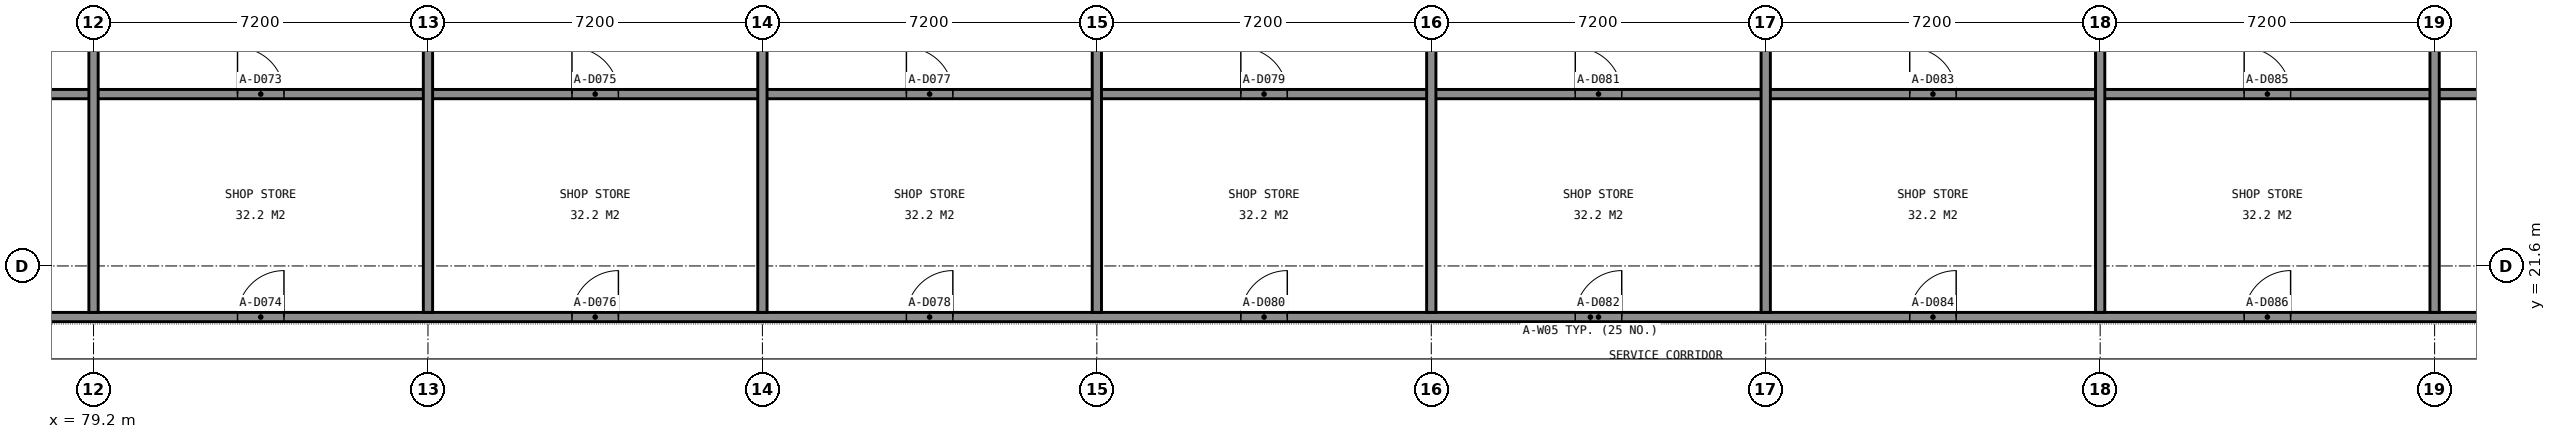
"""IFC4 building model, lengths in metres.
Left out: names, types, materials, properties, quantities, classifications, styles, units other than length and angle.
Written with IfcOpenShell. Run it as: python <this file> out.ifc"""

import sys

from ifc_helpers import new_model, si_unit, direction, frame, frame_2d, origin, place, context, subcontext, project, spatial, rectangle, extrude, element, fill, save


model = new_model("IFC4")
c1 = context("Model", 3, precision=1e-05, world=origin(), true_north=direction((0.0, 1.0)))
c2 = subcontext(c1, "Body", "Model", "MODEL_VIEW")
j1 = project(units=[si_unit("LENGTHUNIT", "METRE"), si_unit("PLANEANGLEUNIT", "RADIAN")], contexts=[c1])
p1 = place(None, origin())
s1 = spatial("IfcSite", under=j1, at=p1, CompositionType="ELEMENT")
p2 = place(p1, origin())
s2 = spatial("IfcBuilding", under=s1, at=p2, CompositionType="ELEMENT")
p3 = place(p2, origin())
s3 = spatial("IfcBuildingStorey", under=s2, at=p3, CompositionType="ELEMENT", Elevation=0.0)
p4 = place(p3, frame((54.35, 20.5, 0.0), z_axis=(0.0, 0.0, 1.0), x_axis=(1.0, 0.0, 0.0)))
e1 = element("IfcWall", 1, at=p4, inside=s3, PredefinedType="PARTITIONING", context=c2, shape_type="SweptSolid", body=[
    extrude(rectangle(XDim=92.9, YDim=0.2, at=frame_2d((46.45, 0.0))), origin(), (0.0, 0.0, 1.0), 3.5),
])
p5 = place(p4, frame((1.1, 0.0, 0.0)))
e2 = element("IfcOpeningElement", 2, at=p5, cuts=e1, PredefinedType="OPENING", context=c2, shape_type="SweptSolid", body=[
    extrude(rectangle(XDim=0.9, YDim=2.1, at=frame_2d((0.45, 1.05))), frame((0.0, 0.11, 0.0), z_axis=(0.0, -1.0, 0.0), x_axis=(1.0, 0.0, 0.0)), (0.0, 0.0, 1.0), 0.22),
])
p6 = place(p4, frame((90.9, 0.0, 0.0)))
e3 = element("IfcOpeningElement", 3, at=p6, cuts=e1, PredefinedType="OPENING", context=c2, shape_type="SweptSolid", body=[
    extrude(rectangle(XDim=0.9, YDim=2.1, at=frame_2d((0.45, 1.05))), frame((0.0, 0.11, 0.0), z_axis=(0.0, -1.0, 0.0), x_axis=(1.0, 0.0, 0.0)), (0.0, 0.0, 1.0), 0.22),
])
p7 = place(p4, frame((6.35, 0.0, 0.0)))
e4 = element("IfcOpeningElement", 4, at=p7, cuts=e1, PredefinedType="OPENING", context=c2, shape_type="SweptSolid", body=[
    extrude(rectangle(XDim=1.0, YDim=2.1, at=frame_2d((0.5, 1.05))), frame((0.0, 0.11, 0.0), z_axis=(0.0, -1.0, 0.0), x_axis=(1.0, 0.0, 0.0)), (0.0, 0.0, 1.0), 0.22),
])
p8 = place(p4, frame((13.55, 0.0, 0.0)))
e5 = element("IfcOpeningElement", 5, at=p8, cuts=e1, PredefinedType="OPENING", context=c2, shape_type="SweptSolid", body=[
    extrude(rectangle(XDim=1.0, YDim=2.1, at=frame_2d((0.5, 1.05))), frame((0.0, 0.11, 0.0), z_axis=(0.0, -1.0, 0.0), x_axis=(1.0, 0.0, 0.0)), (0.0, 0.0, 1.0), 0.22),
])
p9 = place(p4, frame((20.75, 0.0, 0.0)))
e6 = element("IfcOpeningElement", 6, at=p9, cuts=e1, PredefinedType="OPENING", context=c2, shape_type="SweptSolid", body=[
    extrude(rectangle(XDim=1.0, YDim=2.1, at=frame_2d((0.5, 1.05))), frame((0.0, 0.11, 0.0), z_axis=(0.0, -1.0, 0.0), x_axis=(1.0, 0.0, 0.0)), (0.0, 0.0, 1.0), 0.22),
])
p10 = place(p4, frame((27.95, 0.0, 0.0)))
e7 = element("IfcOpeningElement", 7, at=p10, cuts=e1, PredefinedType="OPENING", context=c2, shape_type="SweptSolid", body=[
    extrude(rectangle(XDim=1.0, YDim=2.1, at=frame_2d((0.5, 1.05))), frame((0.0, 0.11, 0.0), z_axis=(0.0, -1.0, 0.0), x_axis=(1.0, 0.0, 0.0)), (0.0, 0.0, 1.0), 0.22),
])
p11 = place(p4, frame((35.15, 0.0, 0.0)))
e8 = element("IfcOpeningElement", 8, at=p11, cuts=e1, PredefinedType="OPENING", context=c2, shape_type="SweptSolid", body=[
    extrude(rectangle(XDim=1.0, YDim=2.1, at=frame_2d((0.5, 1.05))), frame((0.0, 0.11, 0.0), z_axis=(0.0, -1.0, 0.0), x_axis=(1.0, 0.0, 0.0)), (0.0, 0.0, 1.0), 0.22),
])
p12 = place(p4, frame((42.35, 0.0, 0.0)))
e9 = element("IfcOpeningElement", 9, at=p12, cuts=e1, PredefinedType="OPENING", context=c2, shape_type="SweptSolid", body=[
    extrude(rectangle(XDim=1.0, YDim=2.1, at=frame_2d((0.5, 1.05))), frame((0.0, 0.11, 0.0), z_axis=(0.0, -1.0, 0.0), x_axis=(1.0, 0.0, 0.0)), (0.0, 0.0, 1.0), 0.22),
])
p13 = place(p4, frame((49.55, 0.0, 0.0)))
e10 = element("IfcOpeningElement", 10, at=p13, cuts=e1, PredefinedType="OPENING", context=c2, shape_type="SweptSolid", body=[
    extrude(rectangle(XDim=1.0, YDim=2.1, at=frame_2d((0.5, 1.05))), frame((0.0, 0.11, 0.0), z_axis=(0.0, -1.0, 0.0), x_axis=(1.0, 0.0, 0.0)), (0.0, 0.0, 1.0), 0.22),
])
p14 = place(p4, frame((56.75, 0.0, 0.0)))
e11 = element("IfcOpeningElement", 11, at=p14, cuts=e1, PredefinedType="OPENING", context=c2, shape_type="SweptSolid", body=[
    extrude(rectangle(XDim=1.0, YDim=2.1, at=frame_2d((0.5, 1.05))), frame((0.0, 0.11, 0.0), z_axis=(0.0, -1.0, 0.0), x_axis=(1.0, 0.0, 0.0)), (0.0, 0.0, 1.0), 0.22),
])
p15 = place(p4, frame((63.95, 0.0, 0.0)))
e12 = element("IfcOpeningElement", 12, at=p15, cuts=e1, PredefinedType="OPENING", context=c2, shape_type="SweptSolid", body=[
    extrude(rectangle(XDim=1.0, YDim=2.1, at=frame_2d((0.5, 1.05))), frame((0.0, 0.11, 0.0), z_axis=(0.0, -1.0, 0.0), x_axis=(1.0, 0.0, 0.0)), (0.0, 0.0, 1.0), 0.22),
])
p16 = place(p4, frame((71.15, 0.0, 0.0)))
e13 = element("IfcOpeningElement", 13, at=p16, cuts=e1, PredefinedType="OPENING", context=c2, shape_type="SweptSolid", body=[
    extrude(rectangle(XDim=1.0, YDim=2.1, at=frame_2d((0.5, 1.05))), frame((0.0, 0.11, 0.0), z_axis=(0.0, -1.0, 0.0), x_axis=(1.0, 0.0, 0.0)), (0.0, 0.0, 1.0), 0.22),
])
p17 = place(p4, frame((78.35, 0.0, 0.0)))
e14 = element("IfcOpeningElement", 14, at=p17, cuts=e1, PredefinedType="OPENING", context=c2, shape_type="SweptSolid", body=[
    extrude(rectangle(XDim=1.0, YDim=2.1, at=frame_2d((0.5, 1.05))), frame((0.0, 0.11, 0.0), z_axis=(0.0, -1.0, 0.0), x_axis=(1.0, 0.0, 0.0)), (0.0, 0.0, 1.0), 0.22),
])
p18 = place(p4, frame((85.55, 0.0, 0.0)))
e15 = element("IfcOpeningElement", 15, at=p18, cuts=e1, PredefinedType="OPENING", context=c2, shape_type="SweptSolid", body=[
    extrude(rectangle(XDim=1.0, YDim=2.1, at=frame_2d((0.5, 1.05))), frame((0.0, 0.11, 0.0), z_axis=(0.0, -1.0, 0.0), x_axis=(1.0, 0.0, 0.0)), (0.0, 0.0, 1.0), 0.22),
])
p19 = place(p3, frame((57.7, 25.3, 0.0), z_axis=(0.0, 0.0, 1.0), x_axis=(1.0, 0.0, 0.0)))
e16 = element("IfcWall", 16, at=p19, inside=s3, PredefinedType="PARTITIONING", context=c2, shape_type="SweptSolid", body=[
    extrude(rectangle(XDim=86.2, YDim=0.2, at=frame_2d((43.1, 0.0))), origin(), (0.0, 0.0, 1.0), 3.5),
])
p20 = place(p19, frame((3.0, 0.0, 0.0)))
e17 = element("IfcOpeningElement", 17, at=p20, cuts=e16, PredefinedType="OPENING", context=c2, shape_type="SweptSolid", body=[
    extrude(rectangle(XDim=1.0, YDim=2.1, at=frame_2d((0.5, 1.05))), frame((0.0, 0.11, 0.0), z_axis=(0.0, -1.0, 0.0), x_axis=(1.0, 0.0, 0.0)), (0.0, 0.0, 1.0), 0.22),
])
p21 = place(p19, frame((10.2, 0.0, 0.0)))
e18 = element("IfcOpeningElement", 18, at=p21, cuts=e16, PredefinedType="OPENING", context=c2, shape_type="SweptSolid", body=[
    extrude(rectangle(XDim=1.0, YDim=2.1, at=frame_2d((0.5, 1.05))), frame((0.0, 0.11, 0.0), z_axis=(0.0, -1.0, 0.0), x_axis=(1.0, 0.0, 0.0)), (0.0, 0.0, 1.0), 0.22),
])
p22 = place(p19, frame((17.4, 0.0, 0.0)))
e19 = element("IfcOpeningElement", 19, at=p22, cuts=e16, PredefinedType="OPENING", context=c2, shape_type="SweptSolid", body=[
    extrude(rectangle(XDim=1.0, YDim=2.1, at=frame_2d((0.5, 1.05))), frame((0.0, 0.11, 0.0), z_axis=(0.0, -1.0, 0.0), x_axis=(1.0, 0.0, 0.0)), (0.0, 0.0, 1.0), 0.22),
])
p23 = place(p19, frame((24.6, 0.0, 0.0)))
e20 = element("IfcOpeningElement", 20, at=p23, cuts=e16, PredefinedType="OPENING", context=c2, shape_type="SweptSolid", body=[
    extrude(rectangle(XDim=1.0, YDim=2.1, at=frame_2d((0.5, 1.05))), frame((0.0, 0.11, 0.0), z_axis=(0.0, -1.0, 0.0), x_axis=(1.0, 0.0, 0.0)), (0.0, 0.0, 1.0), 0.22),
])
p24 = place(p19, frame((31.8, 0.0, 0.0)))
e21 = element("IfcOpeningElement", 21, at=p24, cuts=e16, PredefinedType="OPENING", context=c2, shape_type="SweptSolid", body=[
    extrude(rectangle(XDim=1.0, YDim=2.1, at=frame_2d((0.5, 1.05))), frame((0.0, 0.11, 0.0), z_axis=(0.0, -1.0, 0.0), x_axis=(1.0, 0.0, 0.0)), (0.0, 0.0, 1.0), 0.22),
])
p25 = place(p19, frame((39.0, 0.0, 0.0)))
e22 = element("IfcOpeningElement", 22, at=p25, cuts=e16, PredefinedType="OPENING", context=c2, shape_type="SweptSolid", body=[
    extrude(rectangle(XDim=1.0, YDim=2.1, at=frame_2d((0.5, 1.05))), frame((0.0, 0.11, 0.0), z_axis=(0.0, -1.0, 0.0), x_axis=(1.0, 0.0, 0.0)), (0.0, 0.0, 1.0), 0.22),
])
p26 = place(p19, frame((46.2, 0.0, 0.0)))
e23 = element("IfcOpeningElement", 23, at=p26, cuts=e16, PredefinedType="OPENING", context=c2, shape_type="SweptSolid", body=[
    extrude(rectangle(XDim=1.0, YDim=2.1, at=frame_2d((0.5, 1.05))), frame((0.0, 0.11, 0.0), z_axis=(0.0, -1.0, 0.0), x_axis=(1.0, 0.0, 0.0)), (0.0, 0.0, 1.0), 0.22),
])
p27 = place(p19, frame((53.4, 0.0, 0.0)))
e24 = element("IfcOpeningElement", 24, at=p27, cuts=e16, PredefinedType="OPENING", context=c2, shape_type="SweptSolid", body=[
    extrude(rectangle(XDim=1.0, YDim=2.1, at=frame_2d((0.5, 1.05))), frame((0.0, 0.11, 0.0), z_axis=(0.0, -1.0, 0.0), x_axis=(1.0, 0.0, 0.0)), (0.0, 0.0, 1.0), 0.22),
])
p28 = place(p19, frame((60.6, 0.0, 0.0)))
e25 = element("IfcOpeningElement", 25, at=p28, cuts=e16, PredefinedType="OPENING", context=c2, shape_type="SweptSolid", body=[
    extrude(rectangle(XDim=1.0, YDim=2.1, at=frame_2d((0.5, 1.05))), frame((0.0, 0.11, 0.0), z_axis=(0.0, -1.0, 0.0), x_axis=(1.0, 0.0, 0.0)), (0.0, 0.0, 1.0), 0.22),
])
p29 = place(p19, frame((67.8, 0.0, 0.0)))
e26 = element("IfcOpeningElement", 26, at=p29, cuts=e16, PredefinedType="OPENING", context=c2, shape_type="SweptSolid", body=[
    extrude(rectangle(XDim=1.0, YDim=2.1, at=frame_2d((0.5, 1.05))), frame((0.0, 0.11, 0.0), z_axis=(0.0, -1.0, 0.0), x_axis=(1.0, 0.0, 0.0)), (0.0, 0.0, 1.0), 0.22),
])
p30 = place(p19, frame((75.0, 0.0, 0.0)))
e27 = element("IfcOpeningElement", 27, at=p30, cuts=e16, PredefinedType="OPENING", context=c2, shape_type="SweptSolid", body=[
    extrude(rectangle(XDim=1.0, YDim=2.1, at=frame_2d((0.5, 1.05))), frame((0.0, 0.11, 0.0), z_axis=(0.0, -1.0, 0.0), x_axis=(1.0, 0.0, 0.0)), (0.0, 0.0, 1.0), 0.22),
])
p31 = place(p19, frame((84.65, 0.0, 0.0)))
e28 = element("IfcOpeningElement", 28, at=p31, cuts=e16, PredefinedType="OPENING", context=c2, shape_type="SweptSolid", body=[
    extrude(rectangle(XDim=0.9, YDim=2.1, at=frame_2d((0.45, 1.05))), frame((0.0, 0.11, 0.0), z_axis=(0.0, -1.0, 0.0), x_axis=(1.0, 0.0, 0.0)), (0.0, 0.0, 1.0), 0.22),
])
for number, where, z_axis, x_axis in (
    (29, (79.2, 20.6, 0.0), (0.0, 0.0, 1.0), (0.0, 1.0, 0.0)),
    (30, (86.4, 20.6, 0.0), (0.0, 0.0, 1.0), (0.0, 1.0, 0.0)),
    (31, (93.6, 20.6, 0.0), (0.0, 0.0, 1.0), (0.0, 1.0, 0.0)),
    (32, (100.8, 20.6, 0.0), (0.0, 0.0, 1.0), (0.0, 1.0, 0.0)),
    (33, (108.0, 20.6, 0.0), (0.0, 0.0, 1.0), (0.0, 1.0, 0.0)),
    (34, (115.2, 20.6, 0.0), (0.0, 0.0, 1.0), (0.0, 1.0, 0.0)),
    (35, (122.4, 20.6, 0.0), (0.0, 0.0, 1.0), (0.0, 1.0, 0.0)),
    (36, (129.6, 20.6, 0.0), (0.0, 0.0, 1.0), (0.0, 1.0, 0.0)),
):
    element("IfcWall", number, at=place(p3, frame(where, z_axis=z_axis, x_axis=x_axis)), inside=s3, PredefinedType="PARTITIONING", context=c2, shape_type="SweptSolid", body=[
        extrude(rectangle(XDim=7.95, YDim=0.2, at=frame_2d((3.975, 0.0))), origin(), (0.0, 0.0, 1.0), 3.5),
    ])
p32 = place(p23, origin())
e37 = element("IfcDoor", 37, at=p32, inside=s3, OperationType="SINGLE_SWING_LEFT", PredefinedType="DOOR", context=c2, shape_type="SweptSolid", body=[
    extrude(rectangle(XDim=1.0, YDim=2.1, at=frame_2d((0.5, 1.05))), frame((0.0, 0.025, 0.0), z_axis=(0.0, -1.0, 0.0), x_axis=(1.0, 0.0, 0.0)), (0.0, 0.0, 1.0), 0.05),
])
fill(e20, e37)
p33 = place(p10, origin())
e38 = element("IfcDoor", 38, at=p33, inside=s3, OperationType="SINGLE_SWING_RIGHT", PredefinedType="DOOR", context=c2, shape_type="SweptSolid", body=[
    extrude(rectangle(XDim=1.0, YDim=2.1, at=frame_2d((0.5, 1.05))), frame((0.0, 0.025, 0.0), z_axis=(0.0, -1.0, 0.0), x_axis=(1.0, 0.0, 0.0)), (0.0, 0.0, 1.0), 0.05),
])
fill(e7, e38)
p34 = place(p24, origin())
e39 = element("IfcDoor", 39, at=p34, inside=s3, OperationType="SINGLE_SWING_LEFT", PredefinedType="DOOR", context=c2, shape_type="SweptSolid", body=[
    extrude(rectangle(XDim=1.0, YDim=2.1, at=frame_2d((0.5, 1.05))), frame((0.0, 0.025, 0.0), z_axis=(0.0, -1.0, 0.0), x_axis=(1.0, 0.0, 0.0)), (0.0, 0.0, 1.0), 0.05),
])
fill(e21, e39)
p35 = place(p11, origin())
e40 = element("IfcDoor", 40, at=p35, inside=s3, OperationType="SINGLE_SWING_RIGHT", PredefinedType="DOOR", context=c2, shape_type="SweptSolid", body=[
    extrude(rectangle(XDim=1.0, YDim=2.1, at=frame_2d((0.5, 1.05))), frame((0.0, 0.025, 0.0), z_axis=(0.0, -1.0, 0.0), x_axis=(1.0, 0.0, 0.0)), (0.0, 0.0, 1.0), 0.05),
])
fill(e8, e40)
p36 = place(p25, origin())
e41 = element("IfcDoor", 41, at=p36, inside=s3, OperationType="SINGLE_SWING_LEFT", PredefinedType="DOOR", context=c2, shape_type="SweptSolid", body=[
    extrude(rectangle(XDim=1.0, YDim=2.1, at=frame_2d((0.5, 1.05))), frame((0.0, 0.025, 0.0), z_axis=(0.0, -1.0, 0.0), x_axis=(1.0, 0.0, 0.0)), (0.0, 0.0, 1.0), 0.05),
])
fill(e22, e41)
p37 = place(p12, origin())
e42 = element("IfcDoor", 42, at=p37, inside=s3, OperationType="SINGLE_SWING_RIGHT", PredefinedType="DOOR", context=c2, shape_type="SweptSolid", body=[
    extrude(rectangle(XDim=1.0, YDim=2.1, at=frame_2d((0.5, 1.05))), frame((0.0, 0.025, 0.0), z_axis=(0.0, -1.0, 0.0), x_axis=(1.0, 0.0, 0.0)), (0.0, 0.0, 1.0), 0.05),
])
fill(e9, e42)
p38 = place(p26, origin())
e43 = element("IfcDoor", 43, at=p38, inside=s3, OperationType="SINGLE_SWING_LEFT", PredefinedType="DOOR", context=c2, shape_type="SweptSolid", body=[
    extrude(rectangle(XDim=1.0, YDim=2.1, at=frame_2d((0.5, 1.05))), frame((0.0, 0.025, 0.0), z_axis=(0.0, -1.0, 0.0), x_axis=(1.0, 0.0, 0.0)), (0.0, 0.0, 1.0), 0.05),
])
fill(e23, e43)
p39 = place(p13, origin())
e44 = element("IfcDoor", 44, at=p39, inside=s3, OperationType="SINGLE_SWING_RIGHT", PredefinedType="DOOR", context=c2, shape_type="SweptSolid", body=[
    extrude(rectangle(XDim=1.0, YDim=2.1, at=frame_2d((0.5, 1.05))), frame((0.0, 0.025, 0.0), z_axis=(0.0, -1.0, 0.0), x_axis=(1.0, 0.0, 0.0)), (0.0, 0.0, 1.0), 0.05),
])
fill(e10, e44)
p40 = place(p27, origin())
e45 = element("IfcDoor", 45, at=p40, inside=s3, OperationType="SINGLE_SWING_LEFT", PredefinedType="DOOR", context=c2, shape_type="SweptSolid", body=[
    extrude(rectangle(XDim=1.0, YDim=2.1, at=frame_2d((0.5, 1.05))), frame((0.0, 0.025, 0.0), z_axis=(0.0, -1.0, 0.0), x_axis=(1.0, 0.0, 0.0)), (0.0, 0.0, 1.0), 0.05),
])
fill(e24, e45)
p41 = place(p14, origin())
e46 = element("IfcDoor", 46, at=p41, inside=s3, OperationType="SINGLE_SWING_RIGHT", PredefinedType="DOOR", context=c2, shape_type="SweptSolid", body=[
    extrude(rectangle(XDim=1.0, YDim=2.1, at=frame_2d((0.5, 1.05))), frame((0.0, 0.025, 0.0), z_axis=(0.0, -1.0, 0.0), x_axis=(1.0, 0.0, 0.0)), (0.0, 0.0, 1.0), 0.05),
])
fill(e11, e46)
p42 = place(p28, origin())
e47 = element("IfcDoor", 47, at=p42, inside=s3, OperationType="SINGLE_SWING_LEFT", PredefinedType="DOOR", context=c2, shape_type="SweptSolid", body=[
    extrude(rectangle(XDim=1.0, YDim=2.1, at=frame_2d((0.5, 1.05))), frame((0.0, 0.025, 0.0), z_axis=(0.0, -1.0, 0.0), x_axis=(1.0, 0.0, 0.0)), (0.0, 0.0, 1.0), 0.05),
])
fill(e25, e47)
p43 = place(p15, origin())
e48 = element("IfcDoor", 48, at=p43, inside=s3, OperationType="SINGLE_SWING_RIGHT", PredefinedType="DOOR", context=c2, shape_type="SweptSolid", body=[
    extrude(rectangle(XDim=1.0, YDim=2.1, at=frame_2d((0.5, 1.05))), frame((0.0, 0.025, 0.0), z_axis=(0.0, -1.0, 0.0), x_axis=(1.0, 0.0, 0.0)), (0.0, 0.0, 1.0), 0.05),
])
fill(e12, e48)
p44 = place(p29, origin())
e49 = element("IfcDoor", 49, at=p44, inside=s3, OperationType="SINGLE_SWING_LEFT", PredefinedType="DOOR", context=c2, shape_type="SweptSolid", body=[
    extrude(rectangle(XDim=1.0, YDim=2.1, at=frame_2d((0.5, 1.05))), frame((0.0, 0.025, 0.0), z_axis=(0.0, -1.0, 0.0), x_axis=(1.0, 0.0, 0.0)), (0.0, 0.0, 1.0), 0.05),
])
fill(e26, e49)
p45 = place(p16, origin())
e50 = element("IfcDoor", 50, at=p45, inside=s3, OperationType="SINGLE_SWING_RIGHT", PredefinedType="DOOR", context=c2, shape_type="SweptSolid", body=[
    extrude(rectangle(XDim=1.0, YDim=2.1, at=frame_2d((0.5, 1.05))), frame((0.0, 0.025, 0.0), z_axis=(0.0, -1.0, 0.0), x_axis=(1.0, 0.0, 0.0)), (0.0, 0.0, 1.0), 0.05),
])
fill(e13, e50)
save(model, sys.argv[1])
